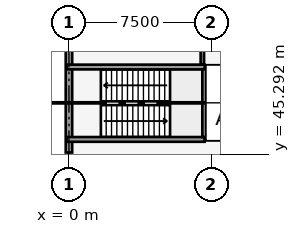
"""IFC4 building model, lengths in metres.
Left out: names, types, materials, properties, quantities, classifications, styles, units other than length and angle.
Written with IfcOpenShell. Run it as: python <this file> out.ifc"""

import sys

from ifc_helpers import new_model, si_unit, direction, frame, frame_2d, origin, origin_2d, place, context, subcontext, project, spatial, rectangle, circle, extrude, element, fill, save


model = new_model("IFC4")
c1 = context("Model", 3, precision=1e-05, world=origin(), true_north=direction((0.0, 1.0)))
c2 = subcontext(c1, "Body", "Model", "MODEL_VIEW")
j1 = project(units=[si_unit("LENGTHUNIT", "METRE"), si_unit("PLANEANGLEUNIT", "RADIAN")], contexts=[c1])
p1 = place(None, origin())
s1 = spatial("IfcSite", under=j1, at=p1, CompositionType="ELEMENT")
p2 = place(p1, origin())
s2 = spatial("IfcBuilding", under=s1, at=p2, CompositionType="ELEMENT")
p3 = place(p2, origin())
s3 = spatial("IfcBuildingStorey", under=s2, at=p3, CompositionType="ELEMENT", Elevation=0.0)
p4 = place(p3, frame((0.0, 45.0, 0.0), z_axis=(0.0, 0.0, 1.0), x_axis=(1.0, 0.0, 0.0)))
e1 = element("IfcColumn", 1, at=p4, inside=s3, PredefinedType="COLUMN", context=c2, shape_type="SweptSolid", body=[
    extrude(circle(Radius=0.375, at=origin_2d()), origin(), (0.0, 0.0, 1.0), 4.8),
])
p5 = place(p3, frame((0.0, 45.385, 0.0), z_axis=(0.0, 0.0, 1.0), x_axis=(0.0, 1.0, 0.0)))
e2 = element("IfcWall", 2, at=p5, inside=s3, PredefinedType="SOLIDWALL", context=c2, shape_type="SweptSolid", body=[
    extrude(rectangle(XDim=6.73, YDim=0.34, at=frame_2d((3.365, 0.0))), origin(), (0.0, 0.0, 1.0), 2.97),
])
p6 = place(p5, frame((2.152, 0.0, 0.0)))
e3 = element("IfcOpeningElement", 3, at=p6, cuts=e2, PredefinedType="OPENING", context=c2, shape_type="SweptSolid", body=[
    extrude(rectangle(XDim=1.8, YDim=2.2, at=frame_2d((0.9, 1.1))), frame((0.0, 0.18, 0.0), z_axis=(0.0, -1.0, 0.0), x_axis=(1.0, 0.0, 0.0)), (0.0, 0.0, 1.0), 0.36),
])
p7 = place(p3, frame((-0.12, 46.075, 0.0), z_axis=(0.0, 0.0, 1.0), x_axis=(1.0, 0.0, 0.0)))
e4 = element("IfcWall", 4, at=p7, inside=s3, PredefinedType="SOLIDWALL", context=c2, shape_type="SweptSolid", body=[
    extrude(rectangle(XDim=7.26, YDim=0.25, at=frame_2d((3.63, 0.0))), origin(), (0.0, 0.0, 1.0), 4.5),
])
p8 = place(p7, frame((0.56, 0.0, 0.0)))
e5 = element("IfcOpeningElement", 5, at=p8, cuts=e4, PredefinedType="OPENING", context=c2, shape_type="SweptSolid", body=[
    extrude(rectangle(XDim=1.1, YDim=2.15, at=frame_2d((0.55, 1.075))), frame((0.0, 0.135, 0.0), z_axis=(0.0, -1.0, 0.0), x_axis=(1.0, 0.0, 0.0)), (0.0, 0.0, 1.0), 0.27),
])
p9 = place(p3, frame((-0.12, 49.885, 0.0), z_axis=(0.0, 0.0, 1.0), x_axis=(1.0, 0.0, 0.0)))
e6 = element("IfcWall", 6, at=p9, inside=s3, PredefinedType="SOLIDWALL", context=c2, shape_type="SweptSolid", body=[
    extrude(rectangle(XDim=7.26, YDim=0.25, at=frame_2d((3.63, 0.0))), origin(), (0.0, 0.0, 1.0), 4.5),
])
p10 = place(p3, frame((7.145, 46.2, 0.0), z_axis=(0.0, 0.0, 1.0), x_axis=(0.0, 1.0, 0.0)))
e7 = element("IfcWall", 7, at=p10, inside=s3, PredefinedType="SOLIDWALL", context=c2, shape_type="SweptSolid", body=[
    extrude(rectangle(XDim=3.56, YDim=0.25, at=frame_2d((1.78, 0.0))), origin(), (0.0, 0.0, 1.0), 4.5),
])
p11 = place(p3, frame((7.02, 50.024, 0.0), z_axis=(0.0, 0.0, 1.0), x_axis=(0.0, 1.0, 0.0)))
e8 = element("IfcWall", 8, at=p11, inside=s3, PredefinedType="PARTITIONING", context=c2, shape_type="SweptSolid", body=[
    extrude(rectangle(XDim=2.344, YDim=0.18, at=frame_2d((1.172, 0.0))), origin(), (0.0, 0.0, 1.0), 2.97),
])
p12 = place(p6, origin())
e9 = element("IfcDoor", 9, at=p12, inside=s3, OperationType="SINGLE_SWING_RIGHT", PredefinedType="DOOR", context=c2, shape_type="SweptSolid", body=[
    extrude(rectangle(XDim=1.8, YDim=2.2, at=frame_2d((0.9, 1.1))), frame((0.0, 0.025, 0.0), z_axis=(0.0, -1.0, 0.0), x_axis=(1.0, 0.0, 0.0)), (0.0, 0.0, 1.0), 0.05),
])
fill(e3, e9)
p13 = place(p8, origin())
e10 = element("IfcDoor", 10, at=p13, inside=s3, OperationType="SINGLE_SWING_RIGHT", PredefinedType="DOOR", context=c2, shape_type="SweptSolid", body=[
    extrude(rectangle(XDim=1.1, YDim=2.15, at=frame_2d((0.55, 1.075))), frame((0.0, 0.025, 0.0), z_axis=(0.0, -1.0, 0.0), x_axis=(1.0, 0.0, 0.0)), (0.0, 0.0, 1.0), 0.05),
])
fill(e5, e10)
save(model, sys.argv[1])
